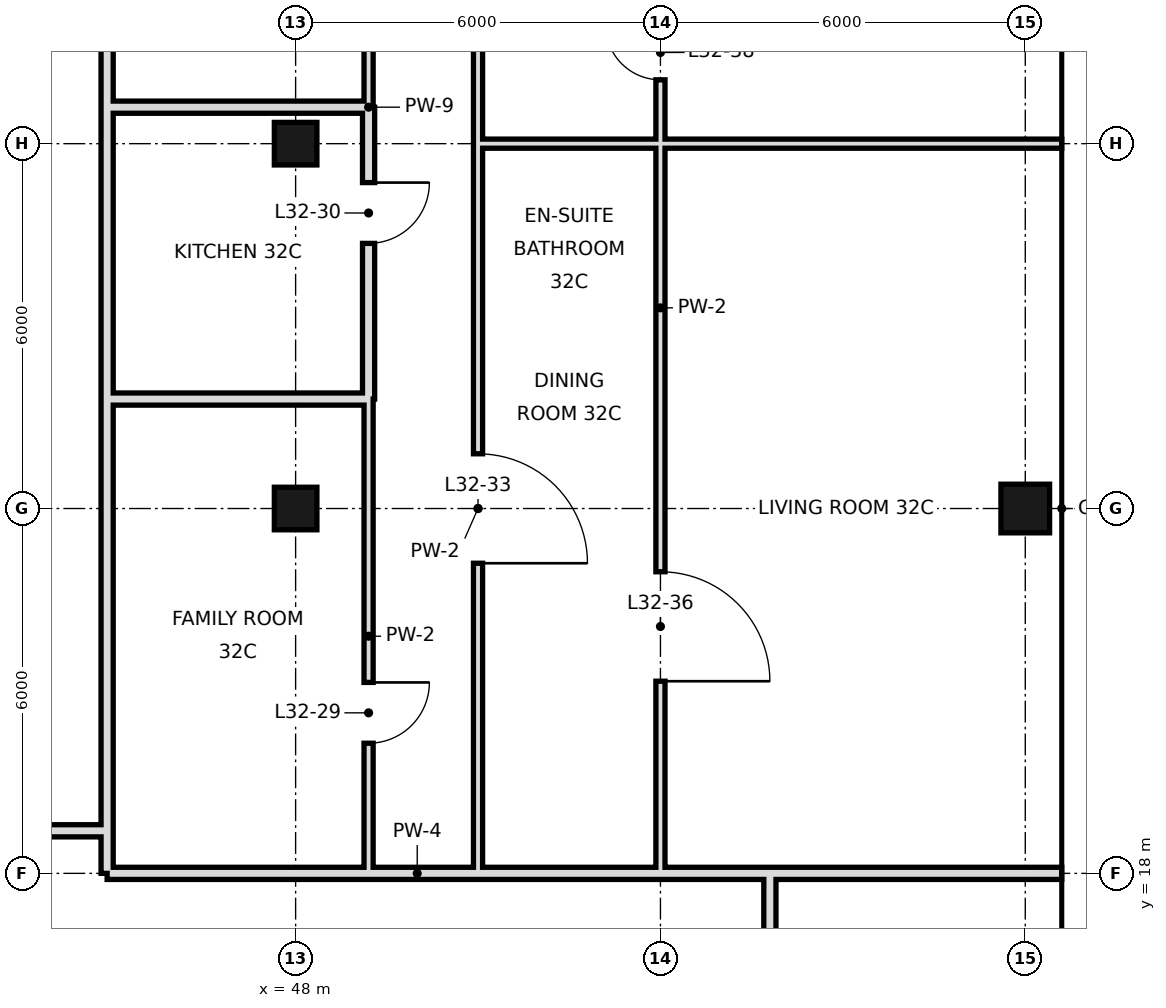
"""IFC4 building model, lengths in metres.
Left out: names, types, materials, properties, quantities, classifications, styles, units other than length and angle.
Written with IfcOpenShell. Run it as: python <this file> out.ifc"""

import sys

from ifc_helpers import new_model, si_unit, direction, frame, frame_2d, origin, origin_2d, place, context, subcontext, project, spatial, rectangle, hollow_rectangle, extrude, element, fill, save


model = new_model("IFC4")
c1 = context("Model", 3, precision=1e-05, world=origin(), true_north=direction((0.0, 1.0)))
c2 = subcontext(c1, "Body", "Model", "MODEL_VIEW")
j1 = project(units=[si_unit("LENGTHUNIT", "METRE"), si_unit("PLANEANGLEUNIT", "RADIAN")], contexts=[c1])
p1 = place(None, origin())
s1 = spatial("IfcSite", under=j1, at=p1, CompositionType="ELEMENT")
p2 = place(p1, origin())
s2 = spatial("IfcBuilding", under=s1, at=p2, CompositionType="ELEMENT")
p3 = place(p2, frame((0.0, 0.0, 143.8)))
s3 = spatial("IfcBuildingStorey", under=s2, at=p3, CompositionType="ELEMENT", Elevation=143.8)
for number, where, z_axis, x_axis in (
    (1, (48.0, 24.0, 0.0), (0.0, 0.0, 1.0), (1.0, 0.0, 0.0)),
    (2, (48.0, 30.0, 0.0), (0.0, 0.0, 1.0), (1.0, 0.0, 0.0)),
):
    element("IfcColumn", number, at=place(p3, frame(where, z_axis=z_axis, x_axis=x_axis)), inside=s3, PredefinedType="COLUMN", context=c2, shape_type="SweptSolid", body=[
        extrude(hollow_rectangle(XDim=0.7, YDim=0.7, WallThickness=0.036, at=origin_2d()), origin(), (0.0, 0.0, 1.0), 3.6),
    ])
p4 = place(p3, frame((60.0, 24.0, 0.0), z_axis=(0.0, 0.0, 1.0), x_axis=(1.0, 0.0, 0.0)))
e3 = element("IfcColumn", 3, at=p4, inside=s3, PredefinedType="COLUMN", context=c2, shape_type="SweptSolid", body=[
    extrude(hollow_rectangle(XDim=0.8, YDim=0.8, WallThickness=0.04, at=origin_2d()), origin(), (0.0, 0.0, 1.0), 3.6),
])
p5 = place(p3, frame((44.9, 18.7, 0.0), z_axis=(0.0, 0.0, 1.0), x_axis=(0.0, 1.0, 0.0)))
e4 = element("IfcWall", 4, at=p5, inside=s3, PredefinedType="SOLIDWALL", context=c2, shape_type="SweptSolid", body=[
    extrude(rectangle(XDim=7.1, YDim=0.2, at=frame_2d((3.55, 0.0))), origin(), (0.0, 0.0, 1.0), 3.42),
])
p6 = place(p3, frame((44.9, 30.6, 0.0), z_axis=(0.0, 0.0, 1.0), x_axis=(0.0, 1.0, 0.0)))
e5 = element("IfcWall", 5, at=p6, inside=s3, PredefinedType="SOLIDWALL", context=c2, shape_type="SweptSolid", body=[
    extrude(rectangle(XDim=18.0, YDim=0.2, at=frame_2d((9.0, 0.0))), origin(), (0.0, 0.0, 1.0), 2.72),
])
p7 = place(p6, frame((11.4, 0.0, 0.0)))
e6 = element("IfcOpeningElement", 6, at=p7, cuts=e5, PredefinedType="OPENING", context=c2, shape_type="SweptSolid", body=[
    extrude(rectangle(XDim=1.2, YDim=2.4, at=frame_2d((0.6, 1.2))), frame((0.0, 0.11, 0.0), z_axis=(0.0, -1.0, 0.0), x_axis=(1.0, 0.0, 0.0)), (0.0, 0.0, 1.0), 0.22),
])
p8 = place(p3, frame((44.9, 25.8, 0.0), z_axis=(0.0, 0.0, 1.0), x_axis=(0.0, 1.0, 0.0)))
e7 = element("IfcWall", 7, at=p8, inside=s3, PredefinedType="SOLIDWALL", context=c2, shape_type="SweptSolid", body=[
    extrude(rectangle(XDim=4.8, YDim=0.2, at=frame_2d((2.4, 0.0))), origin(), (0.0, 0.0, 1.0), 2.97),
])
p9 = place(p3, frame((44.9, 18.0, 0.0), z_axis=(0.0, 0.0, 1.0), x_axis=(0.0, 1.0, 0.0)))
e8 = element("IfcWall", 8, at=p9, inside=s3, PredefinedType="SOLIDWALL", context=c2, shape_type="SweptSolid", body=[
    extrude(rectangle(XDim=0.7, YDim=0.2, at=frame_2d((0.35, 0.0))), origin(), (0.0, 0.0, 1.0), 2.97),
])
p10 = place(p3, frame((49.2, 25.8, 0.0), z_axis=(0.0, 0.0, 1.0), x_axis=(0.0, 1.0, 0.0)))
e9 = element("IfcWall", 9, at=p10, inside=s3, PredefinedType="SOLIDWALL", context=c2, shape_type="SweptSolid", body=[
    extrude(rectangle(XDim=4.8, YDim=0.2, at=frame_2d((2.4, 0.0))), origin(), (0.0, 0.0, 1.0), 2.72),
])
p11 = place(p10, frame((2.56, 0.0, 0.0)))
e10 = element("IfcOpeningElement", 10, at=p11, cuts=e9, PredefinedType="OPENING", context=c2, shape_type="SweptSolid", body=[
    extrude(rectangle(XDim=1.0, YDim=2.4, at=frame_2d((0.5, 1.2))), frame((0.0, 0.11, 0.0), z_axis=(0.0, -1.0, 0.0), x_axis=(1.0, 0.0, 0.0)), (0.0, 0.0, 1.0), 0.22),
])
p12 = place(p3, frame((49.2, 18.0, 0.0), z_axis=(0.0, 0.0, 1.0), x_axis=(0.0, 1.0, 0.0)))
e11 = element("IfcWall", 11, at=p12, inside=s3, PredefinedType="PARTITIONING", context=c2, shape_type="SweptSolid", body=[
    extrude(rectangle(XDim=7.8, YDim=0.15, at=frame_2d((3.9, 0.0))), origin(), (0.0, 0.0, 1.0), 3.42),
])
p13 = place(p12, frame((2.14, 0.0, 0.0)))
e12 = element("IfcOpeningElement", 12, at=p13, cuts=e11, PredefinedType="OPENING", context=c2, shape_type="SweptSolid", body=[
    extrude(rectangle(XDim=1.0, YDim=2.4, at=frame_2d((0.5, 1.2))), frame((0.0, 0.085, 0.0), z_axis=(0.0, -1.0, 0.0), x_axis=(1.0, 0.0, 0.0)), (0.0, 0.0, 1.0), 0.17),
])
p14 = place(p3, frame((49.2, 30.6, 0.0), z_axis=(0.0, 0.0, 1.0), x_axis=(0.0, 1.0, 0.0)))
e13 = element("IfcWall", 13, at=p14, inside=s3, PredefinedType="PARTITIONING", context=c2, shape_type="SweptSolid", body=[
    extrude(rectangle(XDim=15.0, YDim=0.15, at=frame_2d((7.5, 0.0))), origin(), (0.0, 0.0, 1.0), 3.42),
])
p15 = place(p14, frame((12.4, 0.0, 0.0)))
e14 = element("IfcOpeningElement", 14, at=p15, cuts=e13, PredefinedType="OPENING", context=c2, shape_type="SweptSolid", body=[
    extrude(rectangle(XDim=1.0, YDim=2.4, at=frame_2d((0.5, 1.2))), frame((0.0, 0.085, 0.0), z_axis=(0.0, -1.0, 0.0), x_axis=(1.0, 0.0, 0.0)), (0.0, 0.0, 1.0), 0.17),
])
p16 = place(p14, frame((4.0, 0.0, 0.0)))
e15 = element("IfcOpeningElement", 15, at=p16, cuts=e13, PredefinedType="OPENING", context=c2, shape_type="SweptSolid", body=[
    extrude(rectangle(XDim=1.0, YDim=2.4, at=frame_2d((0.5, 1.2))), frame((0.0, 0.085, 0.0), z_axis=(0.0, -1.0, 0.0), x_axis=(1.0, 0.0, 0.0)), (0.0, 0.0, 1.0), 0.17),
])
p17 = place(p3, frame((51.0, 18.0, 0.0), z_axis=(0.0, 0.0, 1.0), x_axis=(0.0, 1.0, 0.0)))
e16 = element("IfcWall", 16, at=p17, inside=s3, PredefinedType="PARTITIONING", context=c2, shape_type="SweptSolid", body=[
    extrude(rectangle(XDim=12.0, YDim=0.15, at=frame_2d((6.0, 0.0))), origin(), (0.0, 0.0, 1.0), 3.42),
])
p18 = place(p17, frame((5.1, 0.0, 0.0)))
e17 = element("IfcOpeningElement", 17, at=p18, cuts=e16, PredefinedType="OPENING", context=c2, shape_type="SweptSolid", body=[
    extrude(rectangle(XDim=1.8, YDim=2.4, at=frame_2d((0.9, 1.2))), frame((0.0, 0.085, 0.0), z_axis=(0.0, -1.0, 0.0), x_axis=(1.0, 0.0, 0.0)), (0.0, 0.0, 1.0), 0.17),
])
p19 = place(p3, frame((51.0, 30.0, 0.0), z_axis=(0.0, 0.0, 1.0), x_axis=(0.0, 1.0, 0.0)))
e18 = element("IfcWall", 18, at=p19, inside=s3, PredefinedType="PARTITIONING", context=c2, shape_type="SweptSolid", body=[
    extrude(rectangle(XDim=3.0, YDim=0.15, at=frame_2d((1.5, 0.0))), origin(), (0.0, 0.0, 1.0), 3.42),
])
p20 = place(p3, frame((54.0, 18.0, 0.0), z_axis=(0.0, 0.0, 1.0), x_axis=(0.0, 1.0, 0.0)))
e19 = element("IfcWall", 19, at=p20, inside=s3, PredefinedType="PARTITIONING", context=c2, shape_type="SweptSolid", body=[
    extrude(rectangle(XDim=12.0, YDim=0.15, at=frame_2d((6.0, 0.0))), origin(), (0.0, 0.0, 1.0), 3.42),
])
p21 = place(p20, frame((3.16, 0.0, 0.0)))
e20 = element("IfcOpeningElement", 20, at=p21, cuts=e19, PredefinedType="OPENING", context=c2, shape_type="SweptSolid", body=[
    extrude(rectangle(XDim=1.8, YDim=2.4, at=frame_2d((0.9, 1.2))), frame((0.0, 0.085, 0.0), z_axis=(0.0, -1.0, 0.0), x_axis=(1.0, 0.0, 0.0)), (0.0, 0.0, 1.0), 0.17),
])
p22 = place(p3, frame((54.0, 30.0, 0.0), z_axis=(0.0, 0.0, 1.0), x_axis=(0.0, 1.0, 0.0)))
e21 = element("IfcWall", 21, at=p22, inside=s3, PredefinedType="PARTITIONING", context=c2, shape_type="SweptSolid", body=[
    extrude(rectangle(XDim=3.0, YDim=0.15, at=frame_2d((1.5, 0.0))), origin(), (0.0, 0.0, 1.0), 3.42),
])
p23 = place(p22, frame((1.05, 0.0, 0.0)))
e22 = element("IfcOpeningElement", 22, at=p23, cuts=e21, PredefinedType="OPENING", context=c2, shape_type="SweptSolid", body=[
    extrude(rectangle(XDim=0.9, YDim=2.4, at=frame_2d((0.45, 1.2))), frame((0.0, 0.085, 0.0), z_axis=(0.0, -1.0, 0.0), x_axis=(1.0, 0.0, 0.0)), (0.0, 0.0, 1.0), 0.17),
])
p24 = place(p3, frame((55.8, 10.8, 0.0), z_axis=(0.0, 0.0, 1.0), x_axis=(0.0, 1.0, 0.0)))
e23 = element("IfcWall", 23, at=p24, inside=s3, PredefinedType="SOLIDWALL", context=c2, shape_type="SweptSolid", body=[
    extrude(rectangle(XDim=7.2, YDim=0.2, at=frame_2d((3.6, 0.0))), origin(), (0.0, 0.0, 1.0), 2.72),
])
p25 = place(p3, frame((55.8, 18.0, 0.0), z_axis=(0.0, 0.0, 1.0), x_axis=(1.0, 0.0, 0.0)))
e24 = element("IfcWall", 24, at=p25, inside=s3, PredefinedType="SOLIDWALL", context=c2, shape_type="SweptSolid", body=[
    extrude(rectangle(XDim=4.8, YDim=0.2, at=frame_2d((2.4, 0.0))), origin(), (0.0, 0.0, 1.0), 2.72),
])
p26 = place(p3, frame((44.9, 18.0, 0.0), z_axis=(0.0, 0.0, 1.0), x_axis=(1.0, 0.0, 0.0)))
e25 = element("IfcWall", 25, at=p26, inside=s3, PredefinedType="SOLIDWALL", context=c2, shape_type="SweptSolid", body=[
    extrude(rectangle(XDim=10.9, YDim=0.2, at=frame_2d((5.45, 0.0))), origin(), (0.0, 0.0, 1.0), 2.72),
])
p27 = place(p3, frame((3.1, 18.7, 0.0), z_axis=(0.0, 0.0, 1.0), x_axis=(1.0, 0.0, 0.0)))
e26 = element("IfcWall", 26, at=p27, inside=s3, PredefinedType="SOLIDWALL", context=c2, shape_type="SweptSolid", body=[
    extrude(rectangle(XDim=41.8, YDim=0.2, at=frame_2d((20.9, 0.0))), origin(), (0.0, 0.0, 1.0), 2.72),
])
p28 = place(p27, frame((5.64, 0.0, 0.0)))
e27 = element("IfcOpeningElement", 27, at=p28, cuts=e26, PredefinedType="OPENING", context=c2, shape_type="SweptSolid", body=[
    extrude(rectangle(XDim=1.2, YDim=2.4, at=frame_2d((0.6, 1.2))), frame((0.0, 0.11, 0.0), z_axis=(0.0, -1.0, 0.0), x_axis=(1.0, 0.0, 0.0)), (0.0, 0.0, 1.0), 0.22),
])
p29 = place(p27, frame((24.16, 0.0, 0.0)))
e28 = element("IfcOpeningElement", 28, at=p29, cuts=e26, PredefinedType="OPENING", context=c2, shape_type="SweptSolid", body=[
    extrude(rectangle(XDim=1.2, YDim=2.4, at=frame_2d((0.6, 1.2))), frame((0.0, 0.11, 0.0), z_axis=(0.0, -1.0, 0.0), x_axis=(1.0, 0.0, 0.0)), (0.0, 0.0, 1.0), 0.22),
])
p30 = place(p3, frame((44.9, 25.8, 0.0), z_axis=(0.0, 0.0, 1.0), x_axis=(1.0, 0.0, 0.0)))
e29 = element("IfcWall", 29, at=p30, inside=s3, PredefinedType="SOLIDWALL", context=c2, shape_type="SweptSolid", body=[
    extrude(rectangle(XDim=4.3, YDim=0.2, at=frame_2d((2.15, 0.0))), origin(), (0.0, 0.0, 1.0), 2.97),
])
p31 = place(p3, frame((54.0, 30.0, 0.0), z_axis=(0.0, 0.0, 1.0), x_axis=(1.0, 0.0, 0.0)))
e30 = element("IfcWall", 30, at=p31, inside=s3, PredefinedType="PARTITIONING", context=c2, shape_type="SweptSolid", body=[
    extrude(rectangle(XDim=6.6, YDim=0.15, at=frame_2d((3.3, 0.0))), origin(), (0.0, 0.0, 1.0), 2.72),
])
p32 = place(p3, frame((51.0, 30.0, 0.0), z_axis=(0.0, 0.0, 1.0), x_axis=(1.0, 0.0, 0.0)))
e31 = element("IfcWall", 31, at=p32, inside=s3, PredefinedType="PARTITIONING", context=c2, shape_type="SweptSolid", body=[
    extrude(rectangle(XDim=3.0, YDim=0.15, at=frame_2d((1.5, 0.0))), origin(), (0.0, 0.0, 1.0), 2.72),
])
p33 = place(p3, frame((44.9, 30.6, 0.0), z_axis=(0.0, 0.0, 1.0), x_axis=(1.0, 0.0, 0.0)))
e32 = element("IfcWall", 32, at=p33, inside=s3, PredefinedType="SOLIDWALL", context=c2, shape_type="SweptSolid", body=[
    extrude(rectangle(XDim=4.3, YDim=0.2, at=frame_2d((2.15, 0.0))), origin(), (0.0, 0.0, 1.0), 2.97),
])
p34 = place(p13, origin())
e33 = element("IfcDoor", 33, at=p34, inside=s3, OperationType="SINGLE_SWING_RIGHT", PredefinedType="DOOR", context=c2, shape_type="SweptSolid", body=[
    extrude(rectangle(XDim=1.0, YDim=2.4, at=frame_2d((0.5, 1.2))), frame((0.0, 0.025, 0.0), z_axis=(0.0, -1.0, 0.0), x_axis=(1.0, 0.0, 0.0)), (0.0, 0.0, 1.0), 0.05),
])
fill(e12, e33)
p35 = place(p11, origin())
e34 = element("IfcDoor", 34, at=p35, inside=s3, OperationType="SINGLE_SWING_RIGHT", PredefinedType="DOOR", context=c2, shape_type="SweptSolid", body=[
    extrude(rectangle(XDim=1.0, YDim=2.4, at=frame_2d((0.5, 1.2))), frame((0.0, 0.025, 0.0), z_axis=(0.0, -1.0, 0.0), x_axis=(1.0, 0.0, 0.0)), (0.0, 0.0, 1.0), 0.05),
])
fill(e10, e34)
p36 = place(p18, frame((1.8, 0.0, 0.0), z_axis=(0.0, 0.0, 1.0), x_axis=(-1.0, 0.0, 0.0)))
e35 = element("IfcDoor", 35, at=p36, inside=s3, OperationType="SINGLE_SWING_RIGHT", PredefinedType="DOOR", context=c2, shape_type="SweptSolid", body=[
    extrude(rectangle(XDim=1.8, YDim=2.4, at=frame_2d((0.9, 1.2))), frame((0.0, 0.025, 0.0), z_axis=(0.0, -1.0, 0.0), x_axis=(1.0, 0.0, 0.0)), (0.0, 0.0, 1.0), 0.05),
])
fill(e17, e35)
p37 = place(p21, frame((1.8, 0.0, 0.0), z_axis=(0.0, 0.0, 1.0), x_axis=(-1.0, 0.0, 0.0)))
e36 = element("IfcDoor", 36, at=p37, inside=s3, OperationType="SINGLE_SWING_RIGHT", PredefinedType="DOOR", context=c2, shape_type="SweptSolid", body=[
    extrude(rectangle(XDim=1.8, YDim=2.4, at=frame_2d((0.9, 1.2))), frame((0.0, 0.025, 0.0), z_axis=(0.0, -1.0, 0.0), x_axis=(1.0, 0.0, 0.0)), (0.0, 0.0, 1.0), 0.05),
])
fill(e20, e36)
p38 = place(p23, frame((0.9, 0.0, 0.0), z_axis=(0.0, 0.0, 1.0), x_axis=(-1.0, 0.0, 0.0)))
e37 = element("IfcDoor", 37, at=p38, inside=s3, OperationType="SINGLE_SWING_LEFT", PredefinedType="DOOR", context=c2, shape_type="SweptSolid", body=[
    extrude(rectangle(XDim=0.9, YDim=2.4, at=frame_2d((0.45, 1.2))), frame((0.0, 0.025, 0.0), z_axis=(0.0, -1.0, 0.0), x_axis=(1.0, 0.0, 0.0)), (0.0, 0.0, 1.0), 0.05),
])
fill(e22, e37)
save(model, sys.argv[1])
